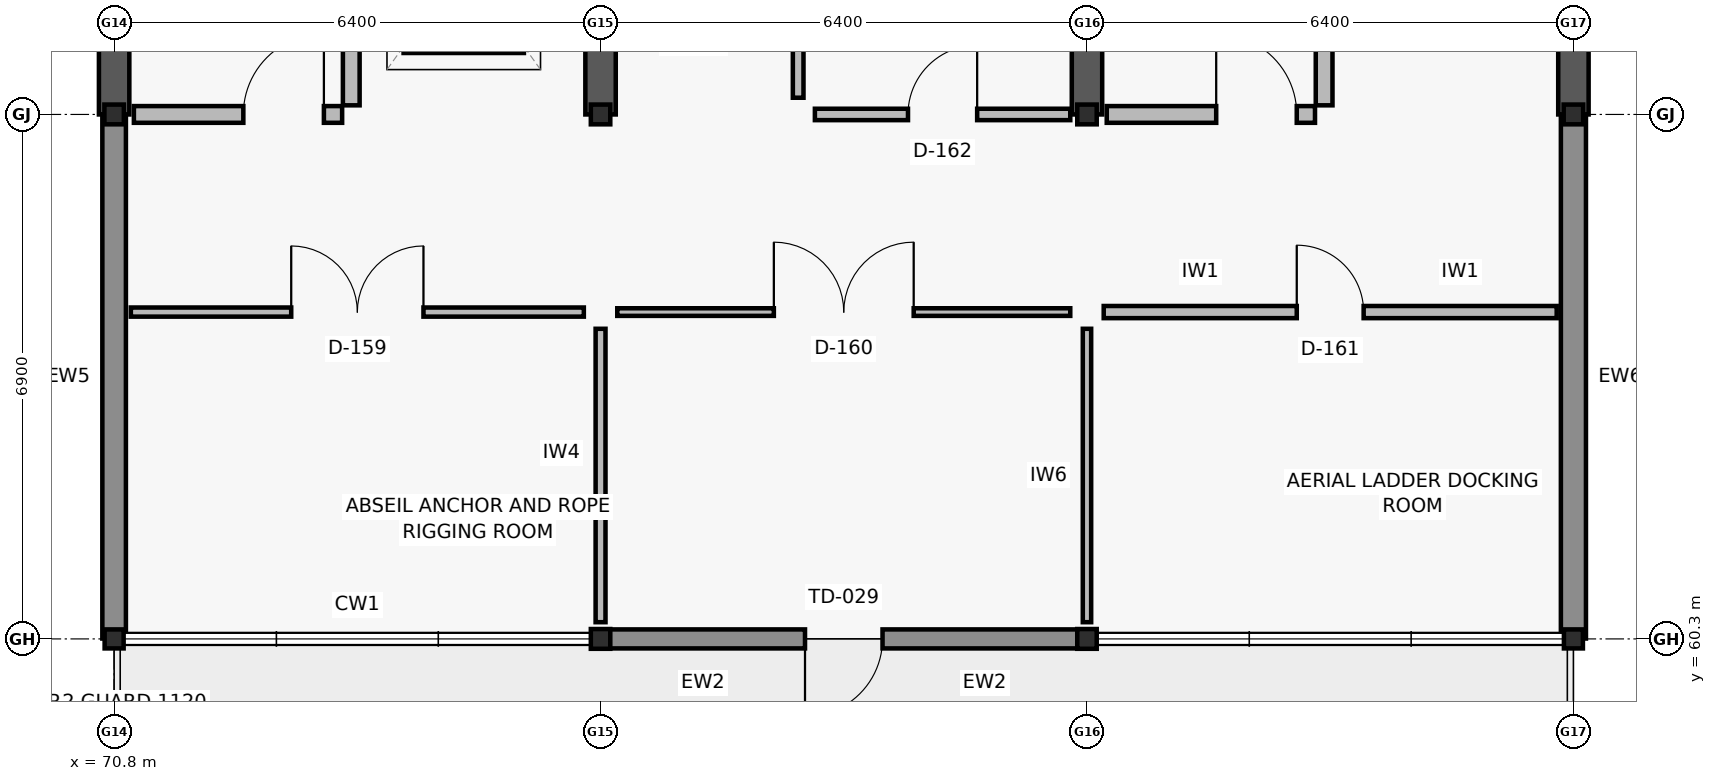
"""IFC4 building model, lengths in metres.
Left out: names, types, materials, properties, quantities, classifications, styles, units other than length and angle.
Written with IfcOpenShell. Run it as: python <this file> out.ifc"""

import sys

from ifc_helpers import new_model, si_unit, direction, frame, frame_2d, origin, origin_2d, place, context, subcontext, project, spatial, rectangle, hollow_rectangle, i_section, extrude, element, fill, save


model = new_model("IFC4")
c1 = context("Model", 3, precision=1e-05, world=origin(), true_north=direction((0.0, 1.0)))
c2 = subcontext(c1, "Body", "Model", "MODEL_VIEW")
j1 = project(units=[si_unit("LENGTHUNIT", "METRE"), si_unit("PLANEANGLEUNIT", "RADIAN")], contexts=[c1])
p1 = place(None, origin())
s1 = spatial("IfcSite", under=j1, at=p1, CompositionType="ELEMENT")
p2 = place(p1, origin())
s2 = spatial("IfcBuilding", under=s1, at=p2, CompositionType="ELEMENT")
p3 = place(p2, frame((0.0, 0.0, 17.4)))
s3 = spatial("IfcBuildingStorey", under=s2, at=p3, CompositionType="ELEMENT", Elevation=17.4)
p4 = place(p3, frame((70.8, 60.3, 0.0), z_axis=(0.0, 0.0, 1.0), x_axis=(1.0, 0.0, 0.0)))
e1 = element("IfcColumn", 1, at=p4, inside=s3, PredefinedType="COLUMN", context=c2, shape_type="SweptSolid", body=[
    extrude(hollow_rectangle(XDim=0.25, YDim=0.25, WallThickness=0.012, at=origin_2d()), origin(), (0.0, 0.0, 1.0), 3.9),
])
for number, where, z_axis, x_axis in (
    (2, (70.8, 67.2, 0.0), (0.0, 0.0, 1.0), (1.0, 0.0, 0.0)),
    (3, (77.2, 60.3, 0.0), (0.0, 0.0, 1.0), (1.0, 0.0, 0.0)),
    (4, (77.2, 67.2, 0.0), (0.0, 0.0, 1.0), (1.0, 0.0, 0.0)),
    (5, (83.6, 60.3, 0.0), (0.0, 0.0, 1.0), (1.0, 0.0, 0.0)),
    (6, (83.6, 67.2, 0.0), (0.0, 0.0, 1.0), (1.0, 0.0, 0.0)),
):
    element("IfcColumn", number, at=place(p3, frame(where, z_axis=z_axis, x_axis=x_axis)), inside=s3, PredefinedType="COLUMN", context=c2, shape_type="SweptSolid", body=[
        extrude(i_section(OverallWidth=0.256, OverallDepth=0.26, WebThickness=0.01, FlangeThickness=0.017, FilletRadius=0.013, at=origin_2d()), origin(), (0.0, 0.0, 1.0), 3.9),
    ])
p5 = place(p3, frame((90.0, 60.3, 0.0), z_axis=(0.0, 0.0, 1.0), x_axis=(1.0, 0.0, 0.0)))
e7 = element("IfcColumn", 7, at=p5, inside=s3, PredefinedType="COLUMN", context=c2, shape_type="SweptSolid", body=[
    extrude(hollow_rectangle(XDim=0.25, YDim=0.25, WallThickness=0.012, at=origin_2d()), origin(), (0.0, 0.0, 1.0), 3.9),
])
p6 = place(p3, frame((90.0, 67.2, 0.0), z_axis=(0.0, 0.0, 1.0), x_axis=(1.0, 0.0, 0.0)))
e8 = element("IfcColumn", 8, at=p6, inside=s3, PredefinedType="COLUMN", context=c2, shape_type="SweptSolid", body=[
    extrude(i_section(OverallWidth=0.256, OverallDepth=0.26, WebThickness=0.01, FlangeThickness=0.017, FilletRadius=0.013, at=origin_2d()), origin(), (0.0, 0.0, 1.0), 3.9),
])
for number, where, z_axis, x_axis in (
    (9, (70.8, 67.2, 0.0), (0.0, 0.0, 1.0), (0.0, 1.0, 0.0)),
    (10, (77.2, 67.2, 0.0), (0.0, 0.0, 1.0), (0.0, 1.0, 0.0)),
    (11, (83.6, 67.2, 0.0), (0.0, 0.0, 1.0), (0.0, 1.0, 0.0)),
    (12, (90.0, 67.2, 0.0), (0.0, 0.0, 1.0), (0.0, 1.0, 0.0)),
):
    element("IfcWall", number, at=place(p3, frame(where, z_axis=z_axis, x_axis=x_axis)), inside=s3, PredefinedType="SHEAR", context=c2, shape_type="SweptSolid", body=[
        extrude(rectangle(XDim=6.7, YDim=0.4, at=frame_2d((3.35, 0.0))), origin(), (0.0, 0.0, 1.0), 3.66),
    ])
p7 = place(p3, frame((83.595, 60.3, 0.0), z_axis=(0.0, 0.0, 1.0), x_axis=(-1.0, 0.0, 0.0)))
e13 = element("IfcWall", 13, at=p7, inside=s3, PredefinedType="SOLIDWALL", context=c2, shape_type="SweptSolid", body=[
    extrude(rectangle(XDim=6.39, YDim=0.25, at=frame_2d((3.195, 0.0))), origin(), (0.0, 0.0, 1.0), 3.02),
])
p8 = place(p7, frame((2.685, 0.0, 0.0)))
e14 = element("IfcOpeningElement", 14, at=p8, cuts=e13, PredefinedType="OPENING", context=c2, shape_type="SweptSolid", body=[
    extrude(rectangle(XDim=1.02, YDim=2.14, at=frame_2d((0.51, 1.07))), frame((0.0, 0.135, 0.0), z_axis=(0.0, -1.0, 0.0), x_axis=(1.0, 0.0, 0.0)), (0.0, 0.0, 1.0), 0.27),
])
p9 = place(p3, frame((70.8, 60.305, 0.0), z_axis=(0.0, 0.0, 1.0), x_axis=(0.0, 1.0, 0.0)))
e15 = element("IfcWall", 15, at=p9, inside=s3, PredefinedType="SOLIDWALL", context=c2, shape_type="SweptSolid", body=[
    extrude(rectangle(XDim=6.89, YDim=0.31, at=frame_2d((3.445, 0.0))), origin(), (0.0, 0.0, 1.0), 3.02),
])
p10 = place(p3, frame((90.0, 67.195, 0.0), z_axis=(0.0, 0.0, 1.0), x_axis=(0.0, -1.0, 0.0)))
e16 = element("IfcWall", 16, at=p10, inside=s3, PredefinedType="SOLIDWALL", context=c2, shape_type="SweptSolid", body=[
    extrude(rectangle(XDim=6.89, YDim=0.33, at=frame_2d((3.445, 0.0))), origin(), (0.0, 0.0, 1.0), 3.02),
])
p11 = place(p3, frame((73.92, 67.32, 0.0), z_axis=(0.0, 0.0, 1.0), x_axis=(0.0, 1.0, 0.0)))
e17 = element("IfcWall", 17, at=p11, inside=s3, PredefinedType="SOLIDWALL", context=c2, shape_type="SweptSolid", body=[
    extrude(rectangle(XDim=6.555, YDim=0.22, at=frame_2d((3.277, 0.0))), origin(), (0.0, 0.0, 1.0), 3.66),
])
p12 = place(p3, frame((71.06, 67.2, 0.0), z_axis=(0.0, 0.0, 1.0), x_axis=(1.0, 0.0, 0.0)))
e18 = element("IfcWall", 18, at=p12, inside=s3, PredefinedType="SOLIDWALL", context=c2, shape_type="SweptSolid", body=[
    extrude(rectangle(XDim=2.74, YDim=0.22, at=frame_2d((1.37, 0.0))), origin(), (0.0, 0.0, 1.0), 3.02),
])
p13 = place(p12, frame((1.44, 0.0, 0.0)))
e19 = element("IfcOpeningElement", 19, at=p13, cuts=e18, PredefinedType="OPENING", context=c2, shape_type="SweptSolid", body=[
    extrude(rectangle(XDim=1.06, YDim=2.1, at=frame_2d((0.53, 1.05))), frame((0.0, 0.12, 0.0), z_axis=(0.0, -1.0, 0.0), x_axis=(1.0, 0.0, 0.0)), (0.0, 0.0, 1.0), 0.24),
])
p14 = place(p3, frame((86.72, 67.32, 0.0), z_axis=(0.0, 0.0, 1.0), x_axis=(0.0, 1.0, 0.0)))
e20 = element("IfcWall", 20, at=p14, inside=s3, PredefinedType="SOLIDWALL", context=c2, shape_type="SweptSolid", body=[
    extrude(rectangle(XDim=6.555, YDim=0.22, at=frame_2d((3.277, 0.0))), origin(), (0.0, 0.0, 1.0), 3.66),
])
p15 = place(p3, frame((83.86, 67.2, 0.0), z_axis=(0.0, 0.0, 1.0), x_axis=(1.0, 0.0, 0.0)))
e21 = element("IfcWall", 21, at=p15, inside=s3, PredefinedType="SOLIDWALL", context=c2, shape_type="SweptSolid", body=[
    extrude(rectangle(XDim=2.74, YDim=0.22, at=frame_2d((1.37, 0.0))), origin(), (0.0, 0.0, 1.0), 3.02),
])
p16 = place(p15, frame((1.44, 0.0, 0.0)))
e22 = element("IfcOpeningElement", 22, at=p16, cuts=e21, PredefinedType="OPENING", context=c2, shape_type="SweptSolid", body=[
    extrude(rectangle(XDim=1.06, YDim=2.1, at=frame_2d((0.53, 1.05))), frame((0.0, 0.12, 0.0), z_axis=(0.0, -1.0, 0.0), x_axis=(1.0, 0.0, 0.0)), (0.0, 0.0, 1.0), 0.24),
])
p17 = place(p3, frame((77.2, 60.52, 0.0), z_axis=(0.0, 0.0, 1.0), x_axis=(0.0, 1.0, 0.0)))
e23 = element("IfcWall", 23, at=p17, inside=s3, PredefinedType="PARTITIONING", context=c2, shape_type="SweptSolid", body=[
    extrude(rectangle(XDim=3.86, YDim=0.13, at=frame_2d((1.93, 0.0))), origin(), (0.0, 0.0, 1.0), 3.0),
])
p18 = place(p3, frame((71.02, 64.6, 0.0), z_axis=(0.0, 0.0, 1.0), x_axis=(1.0, 0.0, 0.0)))
e24 = element("IfcWall", 24, at=p18, inside=s3, PredefinedType="PARTITIONING", context=c2, shape_type="SweptSolid", body=[
    extrude(rectangle(XDim=5.96, YDim=0.12, at=frame_2d((2.98, 0.0))), origin(), (0.0, 0.0, 1.0), 3.0),
])
p19 = place(p18, frame((2.11, 0.0, 0.0)))
e25 = element("IfcOpeningElement", 25, at=p19, cuts=e24, PredefinedType="OPENING", context=c2, shape_type="SweptSolid", body=[
    extrude(rectangle(XDim=1.74, YDim=2.2, at=frame_2d((0.87, 1.1))), frame((0.0, 0.07, 0.0), z_axis=(0.0, -1.0, 0.0), x_axis=(1.0, 0.0, 0.0)), (0.0, 0.0, 1.0), 0.14),
])
p20 = place(p3, frame((83.6, 60.52, 0.0), z_axis=(0.0, 0.0, 1.0), x_axis=(0.0, 1.0, 0.0)))
e26 = element("IfcWall", 26, at=p20, inside=s3, PredefinedType="PARTITIONING", context=c2, shape_type="SweptSolid", body=[
    extrude(rectangle(XDim=3.86, YDim=0.11, at=frame_2d((1.93, 0.0))), origin(), (0.0, 0.0, 1.0), 3.0),
])
p21 = place(p3, frame((77.42, 64.6, 0.0), z_axis=(0.0, 0.0, 1.0), x_axis=(1.0, 0.0, 0.0)))
e27 = element("IfcWall", 27, at=p21, inside=s3, PredefinedType="PARTITIONING", context=c2, shape_type="SweptSolid", body=[
    extrude(rectangle(XDim=5.96, YDim=0.1, at=frame_2d((2.98, 0.0))), origin(), (0.0, 0.0, 1.0), 3.0),
])
p22 = place(p21, frame((2.06, 0.0, 0.0)))
e28 = element("IfcOpeningElement", 28, at=p22, cuts=e27, PredefinedType="OPENING", context=c2, shape_type="SweptSolid", body=[
    extrude(rectangle(XDim=1.84, YDim=2.22, at=frame_2d((0.92, 1.11))), frame((0.0, 0.06, 0.0), z_axis=(0.0, -1.0, 0.0), x_axis=(1.0, 0.0, 0.0)), (0.0, 0.0, 1.0), 0.12),
])
p23 = place(p3, frame((83.82, 64.6, 0.0), z_axis=(0.0, 0.0, 1.0), x_axis=(1.0, 0.0, 0.0)))
e29 = element("IfcWall", 29, at=p23, inside=s3, PredefinedType="PARTITIONING", context=c2, shape_type="SweptSolid", body=[
    extrude(rectangle(XDim=5.96, YDim=0.16, at=frame_2d((2.98, 0.0))), origin(), (0.0, 0.0, 1.0), 3.0),
])
p24 = place(p23, frame((2.54, 0.0, 0.0)))
e30 = element("IfcOpeningElement", 30, at=p24, cuts=e29, PredefinedType="OPENING", context=c2, shape_type="SweptSolid", body=[
    extrude(rectangle(XDim=0.88, YDim=2.04, at=frame_2d((0.44, 1.02))), frame((0.0, 0.09, 0.0), z_axis=(0.0, -1.0, 0.0), x_axis=(1.0, 0.0, 0.0)), (0.0, 0.0, 1.0), 0.18),
])
p25 = place(p3, frame((80.02, 67.2, 0.0), z_axis=(0.0, 0.0, 1.0), x_axis=(1.0, 0.0, 0.0)))
e31 = element("IfcWall", 31, at=p25, inside=s3, PredefinedType="PARTITIONING", context=c2, shape_type="SweptSolid", body=[
    extrude(rectangle(XDim=3.36, YDim=0.15, at=frame_2d((1.68, 0.0))), origin(), (0.0, 0.0, 1.0), 3.0),
])
p26 = place(p25, frame((1.225, 0.0, 0.0)))
e32 = element("IfcOpeningElement", 32, at=p26, cuts=e31, PredefinedType="OPENING", context=c2, shape_type="SweptSolid", body=[
    extrude(rectangle(XDim=0.91, YDim=2.06, at=frame_2d((0.455, 1.03))), frame((0.0, 0.085, 0.0), z_axis=(0.0, -1.0, 0.0), x_axis=(1.0, 0.0, 0.0)), (0.0, 0.0, 1.0), 0.17),
])
p27 = place(p3, frame((79.8, 67.42, 0.0), z_axis=(0.0, 0.0, 1.0), x_axis=(0.0, 1.0, 0.0)))
e33 = element("IfcWall", 33, at=p27, inside=s3, PredefinedType="PARTITIONING", context=c2, shape_type="SweptSolid", body=[
    extrude(rectangle(XDim=6.46, YDim=0.14, at=frame_2d((3.23, 0.0))), origin(), (0.0, 0.0, 1.0), 3.0),
])
p28 = place(p27, frame((2.76, 0.0, 0.0)))
e34 = element("IfcOpeningElement", 34, at=p28, cuts=e33, PredefinedType="OPENING", context=c2, shape_type="SweptSolid", body=[
    extrude(rectangle(XDim=0.94, YDim=2.08, at=frame_2d((0.47, 1.04))), frame((0.0, 0.08, 0.0), z_axis=(0.0, -1.0, 0.0), x_axis=(1.0, 0.0, 0.0)), (0.0, 0.0, 1.0), 0.16),
])
p29 = place(p8, origin())
e35 = element("IfcDoor", 35, at=p29, inside=s3, OperationType="SINGLE_SWING_RIGHT", PredefinedType="DOOR", context=c2, shape_type="SweptSolid", body=[
    extrude(rectangle(XDim=1.02, YDim=2.14, at=frame_2d((0.51, 1.07))), frame((0.0, 0.025, 0.0), z_axis=(0.0, -1.0, 0.0), x_axis=(1.0, 0.0, 0.0)), (0.0, 0.0, 1.0), 0.05),
])
fill(e14, e35)
p30 = place(p13, origin())
e36 = element("IfcDoor", 36, at=p30, inside=s3, OperationType="SINGLE_SWING_RIGHT", PredefinedType="DOOR", context=c2, shape_type="SweptSolid", body=[
    extrude(rectangle(XDim=1.06, YDim=2.1, at=frame_2d((0.53, 1.05))), frame((0.0, 0.025, 0.0), z_axis=(0.0, -1.0, 0.0), x_axis=(1.0, 0.0, 0.0)), (0.0, 0.0, 1.0), 0.05),
])
fill(e19, e36)
p31 = place(p16, origin())
e37 = element("IfcDoor", 37, at=p31, inside=s3, OperationType="SINGLE_SWING_LEFT", PredefinedType="DOOR", context=c2, shape_type="SweptSolid", body=[
    extrude(rectangle(XDim=1.06, YDim=2.1, at=frame_2d((0.53, 1.05))), frame((0.0, 0.025, 0.0), z_axis=(0.0, -1.0, 0.0), x_axis=(1.0, 0.0, 0.0)), (0.0, 0.0, 1.0), 0.05),
])
fill(e22, e37)
p32 = place(p19, origin())
e38 = element("IfcDoor", 38, at=p32, inside=s3, OperationType="DOUBLE_DOOR_SINGLE_SWING", PredefinedType="DOOR", context=c2, shape_type="SweptSolid", body=[
    extrude(rectangle(XDim=1.74, YDim=2.2, at=frame_2d((0.87, 1.1))), frame((0.0, 0.025, 0.0), z_axis=(0.0, -1.0, 0.0), x_axis=(1.0, 0.0, 0.0)), (0.0, 0.0, 1.0), 0.05),
])
fill(e25, e38)
p33 = place(p22, origin())
e39 = element("IfcDoor", 39, at=p33, inside=s3, OperationType="DOUBLE_DOOR_SINGLE_SWING", PredefinedType="DOOR", context=c2, shape_type="SweptSolid", body=[
    extrude(rectangle(XDim=1.84, YDim=2.22, at=frame_2d((0.92, 1.11))), frame((0.0, 0.025, 0.0), z_axis=(0.0, -1.0, 0.0), x_axis=(1.0, 0.0, 0.0)), (0.0, 0.0, 1.0), 0.05),
])
fill(e28, e39)
p34 = place(p24, origin())
e40 = element("IfcDoor", 40, at=p34, inside=s3, OperationType="SINGLE_SWING_LEFT", PredefinedType="DOOR", context=c2, shape_type="SweptSolid", body=[
    extrude(rectangle(XDim=0.88, YDim=2.04, at=frame_2d((0.44, 1.02))), frame((0.0, 0.025, 0.0), z_axis=(0.0, -1.0, 0.0), x_axis=(1.0, 0.0, 0.0)), (0.0, 0.0, 1.0), 0.05),
])
fill(e30, e40)
p35 = place(p26, origin())
e41 = element("IfcDoor", 41, at=p35, inside=s3, OperationType="SINGLE_SWING_RIGHT", PredefinedType="DOOR", context=c2, shape_type="SweptSolid", body=[
    extrude(rectangle(XDim=0.91, YDim=2.06, at=frame_2d((0.455, 1.03))), frame((0.0, 0.025, 0.0), z_axis=(0.0, -1.0, 0.0), x_axis=(1.0, 0.0, 0.0)), (0.0, 0.0, 1.0), 0.05),
])
fill(e32, e41)
save(model, sys.argv[1])
